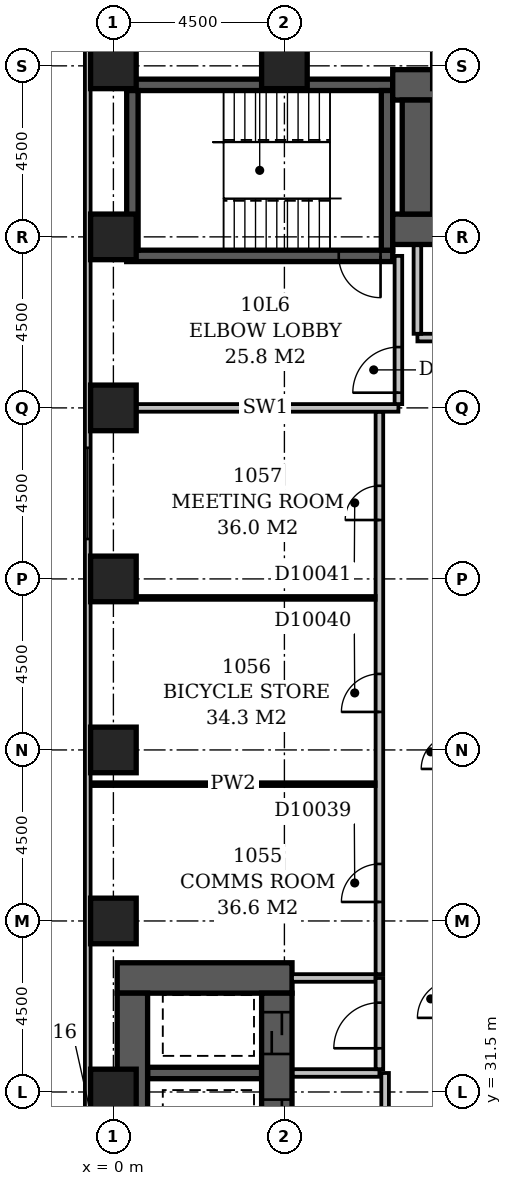
"""IFC4 building model, lengths in metres.
Left out: names, types, materials, properties, quantities, classifications, styles, units other than length and angle.
Written with IfcOpenShell. Run it as: python <this file> out.ifc"""

import sys

from ifc_helpers import new_model, si_unit, direction, frame, frame_2d, origin, origin_2d, place, context, subcontext, project, spatial, rectangle, extrude, element, fill, save


model = new_model("IFC4")
c1 = context("Model", 3, precision=1e-05, world=origin(), true_north=direction((0.0, 1.0)))
c2 = subcontext(c1, "Body", "Model", "MODEL_VIEW")
j1 = project(units=[si_unit("LENGTHUNIT", "METRE"), si_unit("PLANEANGLEUNIT", "RADIAN")], contexts=[c1])
p1 = place(None, origin())
s1 = spatial("IfcSite", under=j1, at=p1, CompositionType="ELEMENT")
p2 = place(p1, origin())
s2 = spatial("IfcBuilding", under=s1, at=p2, CompositionType="ELEMENT")
p3 = place(p2, frame((0.0, 0.0, 47.0)))
s3 = spatial("IfcBuildingStorey", under=s2, at=p3, CompositionType="ELEMENT", Elevation=47.0)
p4 = place(p3, frame((0.1, 34.5, -0.3), z_axis=(0.0, 0.0, 1.0), x_axis=(1.0, 0.0, 0.0)))
e1 = element("IfcWall", 1, at=p4, inside=s3, PredefinedType="SHEAR", context=c2, shape_type="SweptSolid", body=[
    extrude(rectangle(XDim=4.6, YDim=0.8, at=frame_2d((2.3, 0.0))), origin(), (0.0, 0.0, 1.0), 3.6),
])
p5 = place(p3, frame((0.35, 53.5, -0.3), z_axis=(0.0, 0.0, 1.0), x_axis=(1.0, 0.0, 0.0)))
e2 = element("IfcWall", 2, at=p5, inside=s3, PredefinedType="SHEAR", context=c2, shape_type="SweptSolid", body=[
    extrude(rectangle(XDim=7.0, YDim=0.3, at=frame_2d((3.5, 0.0))), origin(), (0.0, 0.0, 1.0), 3.6),
])
p6 = place(p5, frame((5.58, 0.0, 0.3)))
e3 = element("IfcOpeningElement", 3, at=p6, cuts=e2, PredefinedType="OPENING", context=c2, shape_type="SweptSolid", body=[
    extrude(rectangle(XDim=1.1, YDim=2.1, at=frame_2d((0.55, 1.05))), frame((0.0, 0.162, 0.0), z_axis=(0.0, -1.0, 0.0), x_axis=(1.0, 0.0, 0.0)), (0.0, 0.0, 1.0), 0.324),
])
p7 = place(p3, frame((0.35, 58.0, -0.3), z_axis=(0.0, 0.0, 1.0), x_axis=(1.0, 0.0, 0.0)))
e4 = element("IfcWall", 4, at=p7, inside=s3, PredefinedType="SHEAR", context=c2, shape_type="SweptSolid", body=[
    extrude(rectangle(XDim=7.0, YDim=0.3, at=frame_2d((3.5, 0.0))), origin(), (0.0, 0.0, 1.0), 3.6),
])
p8 = place(p3, frame((0.5, 27.15, -0.3), z_axis=(0.0, 0.0, 1.0), x_axis=(0.0, 1.0, 0.0)))
e5 = element("IfcWall", 5, at=p8, inside=s3, PredefinedType="SHEAR", context=c2, shape_type="SweptSolid", body=[
    extrude(rectangle(XDim=6.95, YDim=0.8, at=frame_2d((3.475, 0.0))), origin(), (0.0, 0.0, 1.0), 3.6),
])
p9 = place(p3, frame((0.5, 53.65, -0.3), z_axis=(0.0, 0.0, 1.0), x_axis=(0.0, 1.0, 0.0)))
e6 = element("IfcWall", 6, at=p9, inside=s3, PredefinedType="SHEAR", context=c2, shape_type="SweptSolid", body=[
    extrude(rectangle(XDim=4.2, YDim=0.3, at=frame_2d((2.1, 0.0))), origin(), (0.0, 0.0, 1.0), 3.6),
])
p10 = place(p3, frame((0.9, 32.0, -0.3), z_axis=(0.0, 0.0, 1.0), x_axis=(1.0, 0.0, 0.0)))
e7 = element("IfcWall", 7, at=p10, inside=s3, PredefinedType="SHEAR", context=c2, shape_type="SweptSolid", body=[
    extrude(rectangle(XDim=3.0, YDim=0.3, at=frame_2d((1.5, 0.0))), origin(), (0.0, 0.0, 1.0), 3.6),
])
p11 = place(p3, frame((4.3, 27.15, -0.3), z_axis=(0.0, 0.0, 1.0), x_axis=(0.0, 1.0, 0.0)))
e8 = element("IfcWall", 8, at=p11, inside=s3, PredefinedType="SHEAR", context=c2, shape_type="SweptSolid", body=[
    extrude(rectangle(XDim=6.95, YDim=0.8, at=frame_2d((3.475, 0.0))), origin(), (0.0, 0.0, 1.0), 3.6),
])
p12 = place(p11, frame((3.05, 0.0, 0.3)))
e9 = element("IfcOpeningElement", 9, at=p12, cuts=e8, PredefinedType="OPENING", context=c2, shape_type="SweptSolid", body=[
    extrude(rectangle(XDim=1.1, YDim=2.1, at=frame_2d((0.55, 1.05))), frame((0.0, 0.412, 0.0), z_axis=(0.0, -1.0, 0.0), x_axis=(1.0, 0.0, 0.0)), (0.0, 0.0, 1.0), 0.824),
])
p13 = place(p11, frame((0.55, 0.0, 0.3)))
e10 = element("IfcOpeningElement", 10, at=p13, cuts=e8, PredefinedType="OPENING", context=c2, shape_type="SweptSolid", body=[
    extrude(rectangle(XDim=1.1, YDim=2.1, at=frame_2d((0.55, 1.05))), frame((0.0, 0.412, 0.0), z_axis=(0.0, -1.0, 0.0), x_axis=(1.0, 0.0, 0.0)), (0.0, 0.0, 1.0), 0.824),
])
p14 = place(p11, frame((5.35, 0.0, 0.3)))
e11 = element("IfcOpeningElement", 11, at=p14, cuts=e8, PredefinedType="OPENING", context=c2, shape_type="SweptSolid", body=[
    extrude(rectangle(XDim=1.1, YDim=2.1, at=frame_2d((0.55, 1.05))), frame((0.0, 0.412, 0.0), z_axis=(0.0, -1.0, 0.0), x_axis=(1.0, 0.0, 0.0)), (0.0, 0.0, 1.0), 0.824),
])
p15 = place(p3, frame((7.2, 53.65, -0.3), z_axis=(0.0, 0.0, 1.0), x_axis=(0.0, 1.0, 0.0)))
e12 = element("IfcWall", 12, at=p15, inside=s3, PredefinedType="SHEAR", context=c2, shape_type="SweptSolid", body=[
    extrude(rectangle(XDim=4.2, YDim=0.3, at=frame_2d((2.1, 0.0))), origin(), (0.0, 0.0, 1.0), 3.6),
])
p16 = place(p3, frame((7.35, 54.2, -0.3), z_axis=(0.0, 0.0, 1.0), x_axis=(1.0, 0.0, 0.0)))
e13 = element("IfcWall", 13, at=p16, inside=s3, PredefinedType="SHEAR", context=c2, shape_type="SweptSolid", body=[
    extrude(rectangle(XDim=16.45, YDim=0.8, at=frame_2d((8.225, 0.0))), origin(), (0.0, 0.0, 1.0), 3.6),
])
p17 = place(p16, frame((1.35, 0.0, 0.3)))
e14 = element("IfcOpeningElement", 14, at=p17, cuts=e13, PredefinedType="OPENING", context=c2, shape_type="SweptSolid", body=[
    extrude(rectangle(XDim=1.1, YDim=2.1, at=frame_2d((0.55, 1.05))), frame((0.0, 0.412, 0.0), z_axis=(0.0, -1.0, 0.0), x_axis=(1.0, 0.0, 0.0)), (0.0, 0.0, 1.0), 0.824),
])
p18 = place(p16, frame((3.85, 0.0, 0.3)))
e15 = element("IfcOpeningElement", 15, at=p18, cuts=e13, PredefinedType="OPENING", context=c2, shape_type="SweptSolid", body=[
    extrude(rectangle(XDim=1.1, YDim=2.1, at=frame_2d((0.55, 1.05))), frame((0.0, 0.412, 0.0), z_axis=(0.0, -1.0, 0.0), x_axis=(1.0, 0.0, 0.0)), (0.0, 0.0, 1.0), 0.824),
])
p19 = place(p16, frame((6.35, 0.0, 0.3)))
e16 = element("IfcOpeningElement", 16, at=p19, cuts=e13, PredefinedType="OPENING", context=c2, shape_type="SweptSolid", body=[
    extrude(rectangle(XDim=1.1, YDim=2.1, at=frame_2d((0.55, 1.05))), frame((0.0, 0.412, 0.0), z_axis=(0.0, -1.0, 0.0), x_axis=(1.0, 0.0, 0.0)), (0.0, 0.0, 1.0), 0.824),
])
p20 = place(p16, frame((8.85, 0.0, 0.3)))
e17 = element("IfcOpeningElement", 17, at=p20, cuts=e13, PredefinedType="OPENING", context=c2, shape_type="SweptSolid", body=[
    extrude(rectangle(XDim=1.1, YDim=2.1, at=frame_2d((0.55, 1.05))), frame((0.0, 0.412, 0.0), z_axis=(0.0, -1.0, 0.0), x_axis=(1.0, 0.0, 0.0)), (0.0, 0.0, 1.0), 0.824),
])
p21 = place(p16, frame((11.35, 0.0, 0.3)))
e18 = element("IfcOpeningElement", 18, at=p21, cuts=e13, PredefinedType="OPENING", context=c2, shape_type="SweptSolid", body=[
    extrude(rectangle(XDim=1.1, YDim=2.1, at=frame_2d((0.55, 1.05))), frame((0.0, 0.412, 0.0), z_axis=(0.0, -1.0, 0.0), x_axis=(1.0, 0.0, 0.0)), (0.0, 0.0, 1.0), 0.824),
])
p22 = place(p16, frame((13.85, 0.0, 0.3)))
e19 = element("IfcOpeningElement", 19, at=p22, cuts=e13, PredefinedType="OPENING", context=c2, shape_type="SweptSolid", body=[
    extrude(rectangle(XDim=1.1, YDim=2.1, at=frame_2d((0.55, 1.05))), frame((0.0, 0.412, 0.0), z_axis=(0.0, -1.0, 0.0), x_axis=(1.0, 0.0, 0.0)), (0.0, 0.0, 1.0), 0.824),
])
p23 = place(p3, frame((7.35, 58.0, -0.3), z_axis=(0.0, 0.0, 1.0), x_axis=(1.0, 0.0, 0.0)))
e20 = element("IfcWall", 20, at=p23, inside=s3, PredefinedType="SHEAR", context=c2, shape_type="SweptSolid", body=[
    extrude(rectangle(XDim=16.45, YDim=0.8, at=frame_2d((8.225, 0.0))), origin(), (0.0, 0.0, 1.0), 3.6),
])
p24 = place(p3, frame((8.0, 54.6, -0.3), z_axis=(0.0, 0.0, 1.0), x_axis=(0.0, 1.0, 0.0)))
e21 = element("IfcWall", 21, at=p24, inside=s3, PredefinedType="SHEAR", context=c2, shape_type="SweptSolid", body=[
    extrude(rectangle(XDim=3.0, YDim=0.8, at=frame_2d((1.5, 0.0))), origin(), (0.0, 0.0, 1.0), 3.6),
])
for number, where, z_axis, x_axis in (
    (22, (0.0, 31.5, -0.3), (0.0, 0.0, 1.0), (1.0, 0.0, 0.0)),
    (23, (0.0, 36.0, -0.3), (0.0, 0.0, 1.0), (1.0, 0.0, 0.0)),
    (24, (0.0, 40.5, -0.3), (0.0, 0.0, 1.0), (1.0, 0.0, 0.0)),
    (25, (0.0, 45.0, -0.3), (0.0, 0.0, 1.0), (1.0, 0.0, 0.0)),
    (26, (0.0, 49.5, -0.3), (0.0, 0.0, 1.0), (1.0, 0.0, 0.0)),
    (27, (0.0, 54.0, -0.3), (0.0, 0.0, 1.0), (1.0, 0.0, 0.0)),
    (28, (0.0, 58.5, -0.3), (0.0, 0.0, 1.0), (1.0, 0.0, 0.0)),
    (29, (4.5, 58.5, -0.3), (0.0, 0.0, 1.0), (1.0, 0.0, 0.0)),
):
    element("IfcColumn", number, at=place(p3, frame(where, z_axis=z_axis, x_axis=x_axis)), inside=s3, PredefinedType="COLUMN", context=c2, shape_type="SweptSolid", body=[
        extrude(rectangle(XDim=1.2, YDim=1.2, at=origin_2d()), origin(), (0.0, 0.0, 1.0), 3.6),
    ])
p25 = place(p3, frame((-0.675, 59.1, 0.0), z_axis=(0.0, 0.0, 1.0), x_axis=(0.0, -1.0, 0.0)))
e30 = element("IfcWall", 30, at=p25, inside=s3, PredefinedType="STANDARD", context=c2, shape_type="SweptSolid", body=[
    extrude(rectangle(XDim=55.35, YDim=0.15, at=frame_2d((27.675, 0.0))), origin(), (0.0, 0.0, 1.0), 2.7),
])
p26 = place(p25, frame((10.65, 0.0, 0.6)))
e31 = element("IfcOpeningElement", 31, at=p26, cuts=e30, PredefinedType="OPENING", context=c2, shape_type="SweptSolid", body=[
    extrude(rectangle(XDim=2.4, YDim=1.8, at=frame_2d((1.2, 0.9))), frame((0.0, 0.087, 0.0), z_axis=(0.0, -1.0, 0.0), x_axis=(1.0, 0.0, 0.0)), (0.0, 0.0, 1.0), 0.174),
])
p27 = place(p25, frame((42.15, 0.0, 0.6)))
e32 = element("IfcOpeningElement", 32, at=p27, cuts=e30, PredefinedType="OPENING", context=c2, shape_type="SweptSolid", body=[
    extrude(rectangle(XDim=2.4, YDim=1.8, at=frame_2d((1.2, 0.9))), frame((0.0, 0.087, 0.0), z_axis=(0.0, -1.0, 0.0), x_axis=(1.0, 0.0, 0.0)), (0.0, 0.0, 1.0), 0.174),
])
p28 = place(p3, frame((8.0, 51.35, 0.0), z_axis=(0.0, 0.0, 1.0), x_axis=(1.0, 0.0, 0.0)))
e33 = element("IfcWall", 33, at=p28, inside=s3, PredefinedType="PARTITIONING", context=c2, shape_type="SweptSolid", body=[
    extrude(rectangle(XDim=15.0, YDim=0.2, at=frame_2d((7.5, 0.0))), origin(), (0.0, 0.0, 1.0), 3.3),
])
p29 = place(p28, frame((3.4, 0.0, 0.0)))
e34 = element("IfcOpeningElement", 34, at=p29, cuts=e33, PredefinedType="OPENING", context=c2, shape_type="SweptSolid", body=[
    extrude(rectangle(XDim=1.2, YDim=2.1, at=frame_2d((0.6, 1.05))), frame((0.0, 0.112, 0.0), z_axis=(0.0, -1.0, 0.0), x_axis=(1.0, 0.0, 0.0)), (0.0, 0.0, 1.0), 0.224),
])
p30 = place(p28, frame((9.4, 0.0, 0.0)))
e35 = element("IfcOpeningElement", 35, at=p30, cuts=e33, PredefinedType="OPENING", context=c2, shape_type="SweptSolid", body=[
    extrude(rectangle(XDim=1.2, YDim=2.1, at=frame_2d((0.6, 1.05))), frame((0.0, 0.112, 0.0), z_axis=(0.0, -1.0, 0.0), x_axis=(1.0, 0.0, 0.0)), (0.0, 0.0, 1.0), 0.224),
])
p31 = place(p3, frame((8.0, 51.45, 0.0), z_axis=(0.0, 0.0, 1.0), x_axis=(0.0, 1.0, 0.0)))
e36 = element("IfcWall", 36, at=p31, inside=s3, PredefinedType="PARTITIONING", context=c2, shape_type="SweptSolid", body=[
    extrude(rectangle(XDim=2.33, YDim=0.2, at=frame_2d((1.165, 0.0))), origin(), (0.0, 0.0, 1.0), 3.3),
])
p32 = place(p3, frame((4.72, 32.0, 0.0), z_axis=(0.0, 0.0, 1.0), x_axis=(1.0, 0.0, 0.0)))
e37 = element("IfcWall", 37, at=p32, inside=s3, PredefinedType="PARTITIONING", context=c2, shape_type="SweptSolid", body=[
    extrude(rectangle(XDim=2.28, YDim=0.2, at=frame_2d((1.14, 0.0))), origin(), (0.0, 0.0, 1.0), 3.3),
])
p33 = place(p3, frame((7.0, 32.1, 0.0), z_axis=(0.0, 0.0, 1.0), x_axis=(0.0, 1.0, 0.0)))
e38 = element("IfcWall", 38, at=p33, inside=s3, PredefinedType="PARTITIONING", context=c2, shape_type="SweptSolid", body=[
    extrude(rectangle(XDim=2.4, YDim=0.2, at=frame_2d((1.2, 0.0))), origin(), (0.0, 0.0, 1.0), 3.3),
])
p34 = place(p33, frame((0.55, 0.0, 0.0)))
e39 = element("IfcOpeningElement", 39, at=p34, cuts=e38, PredefinedType="OPENING", context=c2, shape_type="SweptSolid", body=[
    extrude(rectangle(XDim=1.2, YDim=2.1, at=frame_2d((0.6, 1.05))), frame((0.0, 0.112, 0.0), z_axis=(0.0, -1.0, 0.0), x_axis=(1.0, 0.0, 0.0)), (0.0, 0.0, 1.0), 0.224),
])
p35 = place(p3, frame((4.7, 34.5, 0.0), z_axis=(0.0, 0.0, 1.0), x_axis=(1.0, 0.0, 0.0)))
e40 = element("IfcWall", 40, at=p35, inside=s3, PredefinedType="PARTITIONING", context=c2, shape_type="SweptSolid", body=[
    extrude(rectangle(XDim=2.2, YDim=0.2, at=frame_2d((1.1, 0.0))), origin(), (0.0, 0.0, 1.0), 3.3),
])
p36 = place(p3, frame((7.15, 27.17, 0.0), z_axis=(0.0, 0.0, 1.0), x_axis=(0.0, 1.0, 0.0)))
e41 = element("IfcWall", 41, at=p36, inside=s3, PredefinedType="PARTITIONING", context=c2, shape_type="SweptSolid", body=[
    extrude(rectangle(XDim=4.83, YDim=0.2, at=frame_2d((2.415, 0.0))), origin(), (0.0, 0.0, 1.0), 3.3),
])
p37 = place(p36, frame((1.73, 0.0, 0.0)))
e42 = element("IfcOpeningElement", 42, at=p37, cuts=e41, PredefinedType="OPENING", context=c2, shape_type="SweptSolid", body=[
    extrude(rectangle(XDim=1.2, YDim=2.1, at=frame_2d((0.6, 1.05))), frame((0.0, 0.112, 0.0), z_axis=(0.0, -1.0, 0.0), x_axis=(1.0, 0.0, 0.0)), (0.0, 0.0, 1.0), 0.224),
])
p38 = place(p3, frame((0.5, 49.5, 0.0), z_axis=(0.0, 0.0, 1.0), x_axis=(1.0, 0.0, 0.0)))
e43 = element("IfcWall", 43, at=p38, inside=s3, PredefinedType="PARTITIONING", context=c2, shape_type="SweptSolid", body=[
    extrude(rectangle(XDim=7.0, YDim=0.2, at=frame_2d((3.5, 0.0))), origin(), (0.0, 0.0, 1.0), 3.3),
])
p39 = place(p3, frame((7.5, 49.6, 0.0), z_axis=(0.0, 0.0, 1.0), x_axis=(0.0, 1.0, 0.0)))
e44 = element("IfcWall", 44, at=p39, inside=s3, PredefinedType="PARTITIONING", context=c2, shape_type="SweptSolid", body=[
    extrude(rectangle(XDim=3.9, YDim=0.2, at=frame_2d((1.95, 0.0))), origin(), (0.0, 0.0, 1.0), 3.3),
])
p40 = place(p39, frame((0.3, 0.0, 0.0)))
e45 = element("IfcOpeningElement", 45, at=p40, cuts=e44, PredefinedType="OPENING", context=c2, shape_type="SweptSolid", body=[
    extrude(rectangle(XDim=1.2, YDim=2.1, at=frame_2d((0.6, 1.05))), frame((0.0, 0.112, 0.0), z_axis=(0.0, -1.0, 0.0), x_axis=(1.0, 0.0, 0.0)), (0.0, 0.0, 1.0), 0.224),
])
p41 = place(p3, frame((7.0, 34.6, 0.0), z_axis=(0.0, 0.0, 1.0), x_axis=(0.0, 1.0, 0.0)))
e46 = element("IfcWall", 46, at=p41, inside=s3, PredefinedType="PARTITIONING", context=c2, shape_type="SweptSolid", body=[
    extrude(rectangle(XDim=14.8, YDim=0.2, at=frame_2d((7.4, 0.0))), origin(), (0.0, 0.0, 1.0), 3.3),
])
p42 = place(p41, frame((1.9, 0.0, 0.0)))
e47 = element("IfcOpeningElement", 47, at=p42, cuts=e46, PredefinedType="OPENING", context=c2, shape_type="SweptSolid", body=[
    extrude(rectangle(XDim=1.0, YDim=2.1, at=frame_2d((0.5, 1.05))), frame((0.0, 0.112, 0.0), z_axis=(0.0, -1.0, 0.0), x_axis=(1.0, 0.0, 0.0)), (0.0, 0.0, 1.0), 0.224),
])
p43 = place(p41, frame((6.9, 0.0, 0.0)))
e48 = element("IfcOpeningElement", 48, at=p43, cuts=e46, PredefinedType="OPENING", context=c2, shape_type="SweptSolid", body=[
    extrude(rectangle(XDim=1.0, YDim=2.1, at=frame_2d((0.5, 1.05))), frame((0.0, 0.112, 0.0), z_axis=(0.0, -1.0, 0.0), x_axis=(1.0, 0.0, 0.0)), (0.0, 0.0, 1.0), 0.224),
])
p44 = place(p41, frame((11.95, 0.0, 0.0)))
e49 = element("IfcOpeningElement", 49, at=p44, cuts=e46, PredefinedType="OPENING", context=c2, shape_type="SweptSolid", body=[
    extrude(rectangle(XDim=0.9, YDim=2.1, at=frame_2d((0.45, 1.05))), frame((0.0, 0.112, 0.0), z_axis=(0.0, -1.0, 0.0), x_axis=(1.0, 0.0, 0.0)), (0.0, 0.0, 1.0), 0.224),
])
p45 = place(p3, frame((-0.6, 39.6, 0.0), z_axis=(0.0, 0.0, 1.0), x_axis=(1.0, 0.0, 0.0)))
e50 = element("IfcWall", 50, at=p45, inside=s3, PredefinedType="PARTITIONING", context=c2, shape_type="SweptSolid", body=[
    extrude(rectangle(XDim=7.5, YDim=0.1, at=frame_2d((3.75, 0.0))), origin(), (0.0, 0.0, 1.0), 3.3),
])
p46 = place(p3, frame((0.6, 44.5, 0.0), z_axis=(0.0, 0.0, 1.0), x_axis=(1.0, 0.0, 0.0)))
e51 = element("IfcWall", 51, at=p46, inside=s3, PredefinedType="PARTITIONING", context=c2, shape_type="SweptSolid", body=[
    extrude(rectangle(XDim=6.3, YDim=0.1, at=frame_2d((3.15, 0.0))), origin(), (0.0, 0.0, 1.0), 3.3),
])
p47 = place(p26, origin())
e52 = element("IfcWindow", 52, at=p47, inside=s3, PartitioningType="SINGLE_PANEL", PredefinedType="WINDOW", context=c2, shape_type="SweptSolid", body=[
    extrude(rectangle(XDim=2.4, YDim=1.8, at=frame_2d((1.2, 0.9))), frame((0.0, 0.03, 0.0), z_axis=(0.0, -1.0, 0.0), x_axis=(1.0, 0.0, 0.0)), (0.0, 0.0, 1.0), 0.06),
])
fill(e31, e52)
p48 = place(p40, origin())
e53 = element("IfcDoor", 53, at=p48, inside=s3, OperationType="SINGLE_SWING_LEFT", PredefinedType="DOOR", context=c2, shape_type="SweptSolid", body=[
    extrude(rectangle(XDim=1.2, YDim=2.1, at=frame_2d((0.6, 1.05))), frame((0.0, 0.025, 0.0), z_axis=(0.0, -1.0, 0.0), x_axis=(1.0, 0.0, 0.0)), (0.0, 0.0, 1.0), 0.05),
])
fill(e45, e53)
p49 = place(p12, origin())
e54 = element("IfcDoor", 54, at=p49, inside=s3, OperationType="SLIDING_TO_LEFT", PredefinedType="DOOR", context=c2, shape_type="SweptSolid", body=[
    extrude(rectangle(XDim=1.1, YDim=2.1, at=frame_2d((0.55, 1.05))), frame((0.0, 0.025, 0.0), z_axis=(0.0, -1.0, 0.0), x_axis=(1.0, 0.0, 0.0)), (0.0, 0.0, 1.0), 0.05),
])
fill(e9, e54)
p50 = place(p34, origin())
e55 = element("IfcDoor", 55, at=p50, inside=s3, OperationType="SINGLE_SWING_LEFT", PredefinedType="DOOR", context=c2, shape_type="SweptSolid", body=[
    extrude(rectangle(XDim=1.2, YDim=2.1, at=frame_2d((0.6, 1.05))), frame((0.0, 0.025, 0.0), z_axis=(0.0, -1.0, 0.0), x_axis=(1.0, 0.0, 0.0)), (0.0, 0.0, 1.0), 0.05),
])
fill(e39, e55)
p51 = place(p14, origin())
e56 = element("IfcDoor", 56, at=p51, inside=s3, OperationType="SLIDING_TO_LEFT", PredefinedType="DOOR", context=c2, shape_type="SweptSolid", body=[
    extrude(rectangle(XDim=1.1, YDim=2.1, at=frame_2d((0.55, 1.05))), frame((0.0, 0.025, 0.0), z_axis=(0.0, -1.0, 0.0), x_axis=(1.0, 0.0, 0.0)), (0.0, 0.0, 1.0), 0.05),
])
fill(e11, e56)
p52 = place(p6, origin())
e57 = element("IfcDoor", 57, at=p52, inside=s3, OperationType="SINGLE_SWING_RIGHT", PredefinedType="DOOR", context=c2, shape_type="SweptSolid", body=[
    extrude(rectangle(XDim=1.1, YDim=2.1, at=frame_2d((0.55, 1.05))), frame((0.0, 0.025, 0.0), z_axis=(0.0, -1.0, 0.0), x_axis=(1.0, 0.0, 0.0)), (0.0, 0.0, 1.0), 0.05),
])
fill(e3, e57)
p53 = place(p42, origin())
e58 = element("IfcDoor", 58, at=p53, inside=s3, OperationType="SINGLE_SWING_LEFT", PredefinedType="DOOR", context=c2, shape_type="SweptSolid", body=[
    extrude(rectangle(XDim=1.0, YDim=2.1, at=frame_2d((0.5, 1.05))), frame((0.0, 0.025, 0.0), z_axis=(0.0, -1.0, 0.0), x_axis=(1.0, 0.0, 0.0)), (0.0, 0.0, 1.0), 0.05),
])
fill(e47, e58)
p54 = place(p43, origin())
e59 = element("IfcDoor", 59, at=p54, inside=s3, OperationType="SINGLE_SWING_LEFT", PredefinedType="DOOR", context=c2, shape_type="SweptSolid", body=[
    extrude(rectangle(XDim=1.0, YDim=2.1, at=frame_2d((0.5, 1.05))), frame((0.0, 0.025, 0.0), z_axis=(0.0, -1.0, 0.0), x_axis=(1.0, 0.0, 0.0)), (0.0, 0.0, 1.0), 0.05),
])
fill(e48, e59)
p55 = place(p44, origin())
e60 = element("IfcDoor", 60, at=p55, inside=s3, OperationType="SINGLE_SWING_LEFT", PredefinedType="DOOR", context=c2, shape_type="SweptSolid", body=[
    extrude(rectangle(XDim=0.9, YDim=2.1, at=frame_2d((0.45, 1.05))), frame((0.0, 0.025, 0.0), z_axis=(0.0, -1.0, 0.0), x_axis=(1.0, 0.0, 0.0)), (0.0, 0.0, 1.0), 0.05),
])
fill(e49, e60)
save(model, sys.argv[1])
